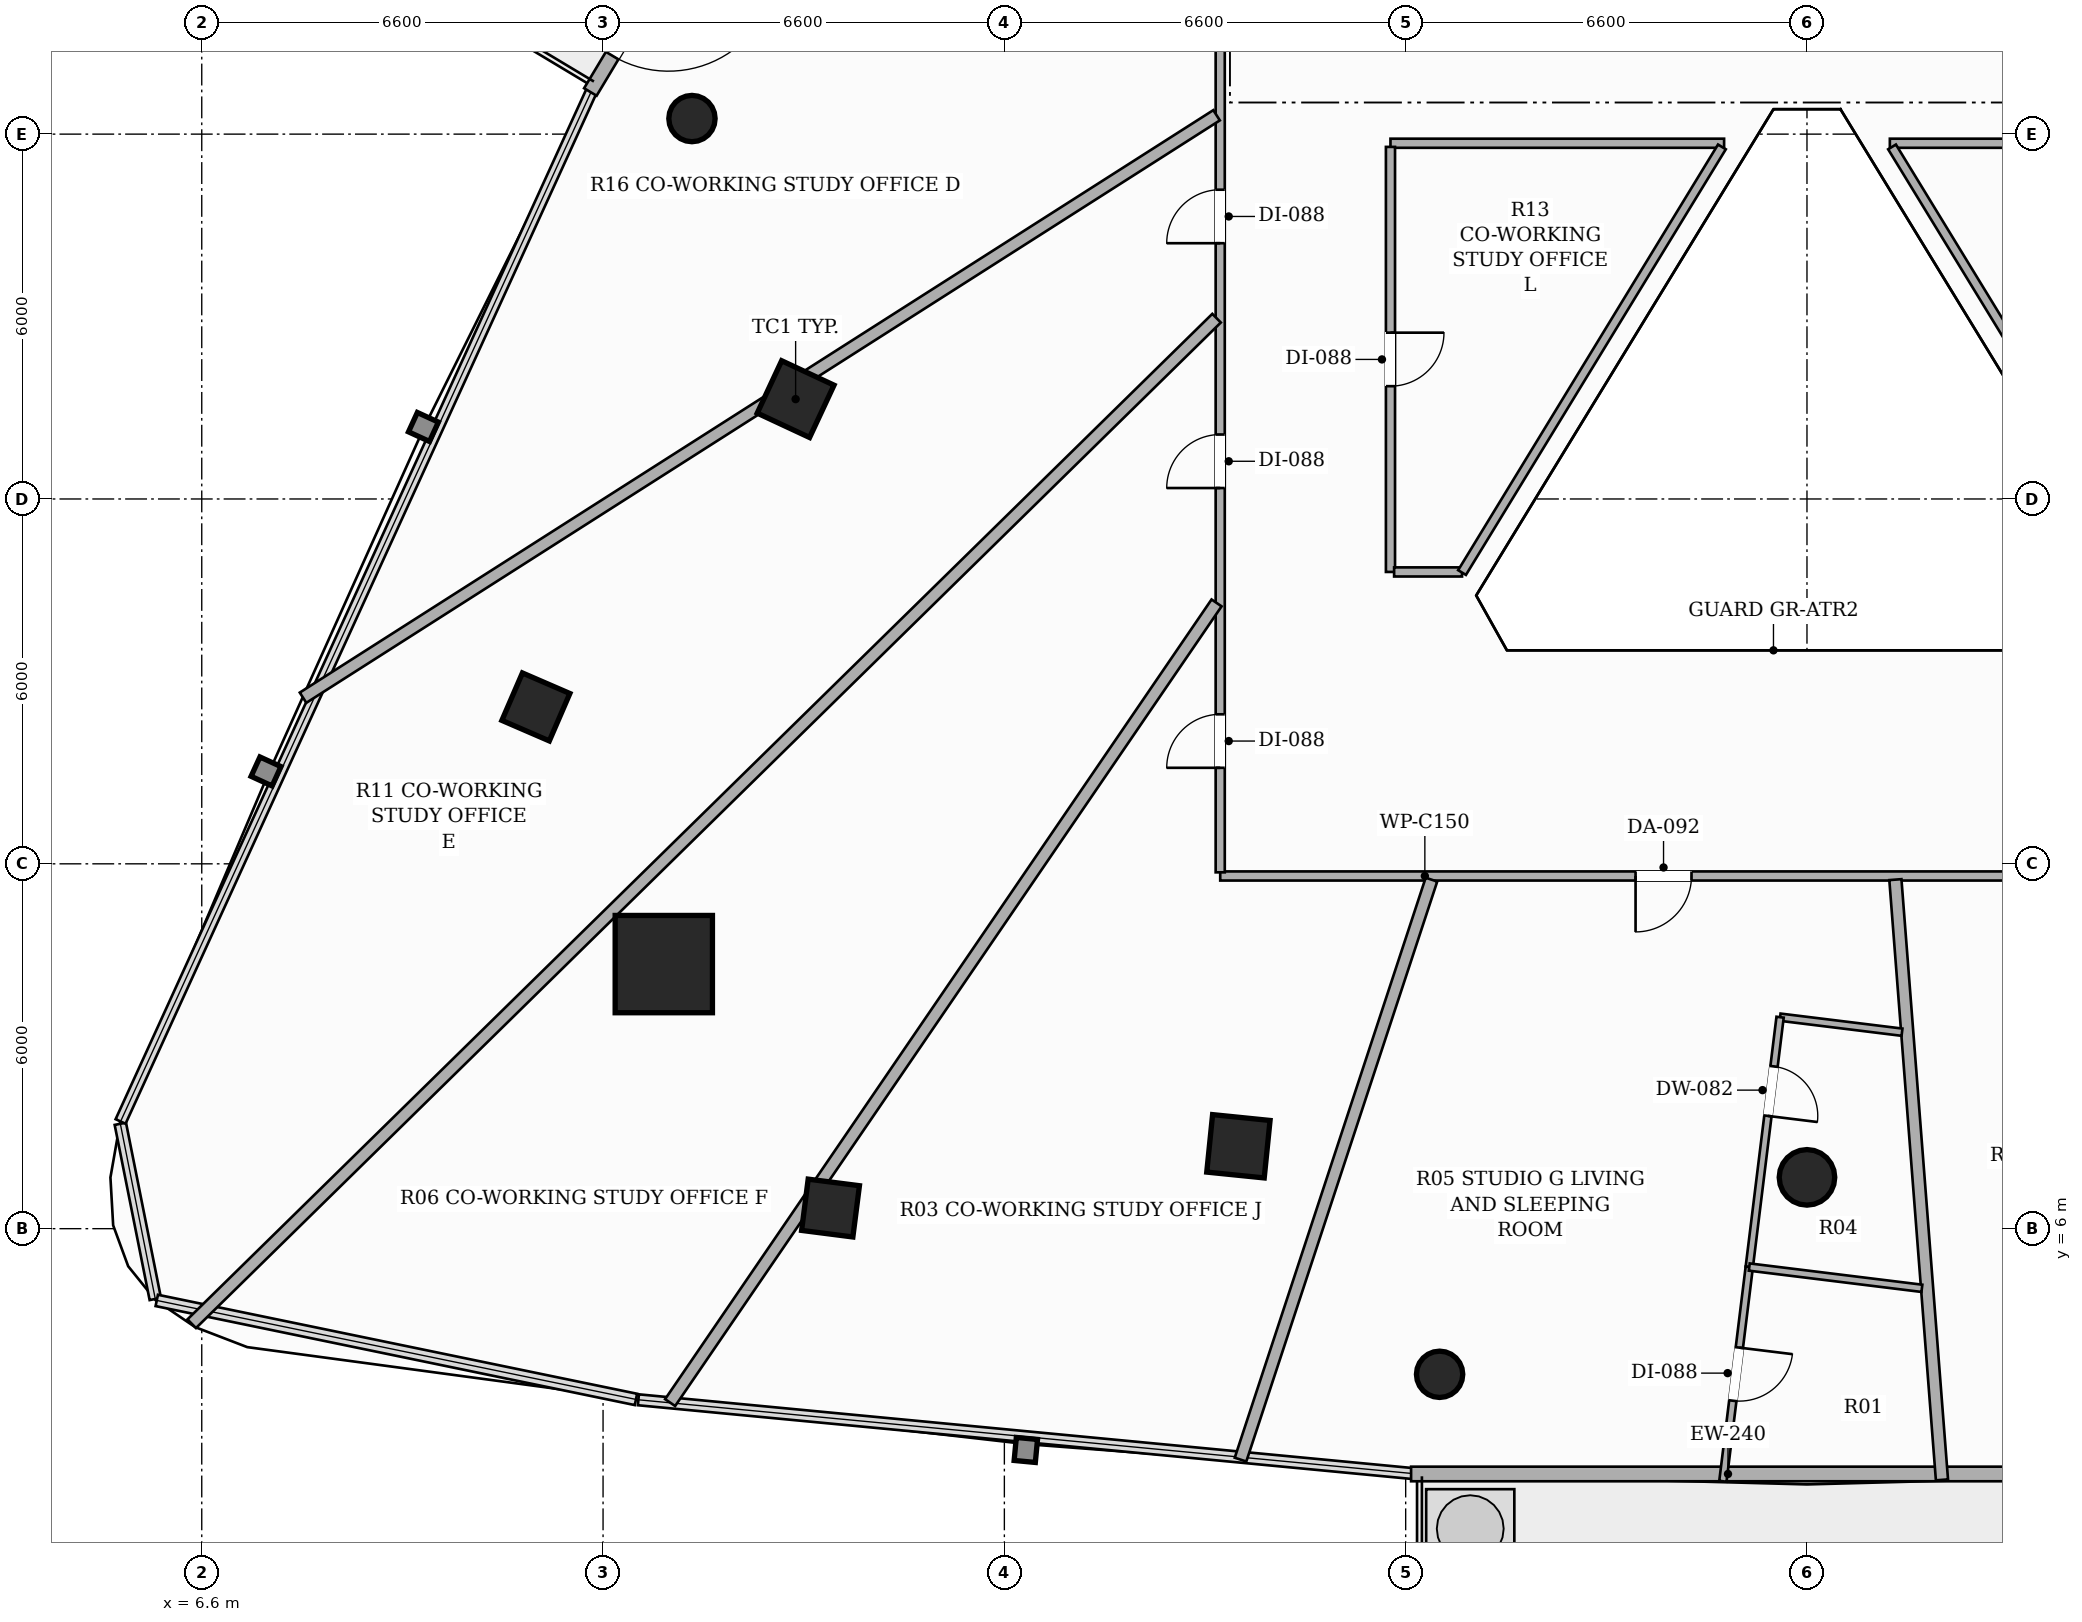
"""IFC4 building model, lengths in metres.
Left out: names, types, materials, properties, quantities, classifications, styles, units other than length and angle.
Written with IfcOpenShell. Run it as: python <this file> out.ifc"""

import sys

from ifc_helpers import new_model, si_unit, direction, frame, frame_2d, origin, origin_2d, place, context, subcontext, project, spatial, rectangle, hollow_rectangle, hollow_circle, extrude, element, fill, save


model = new_model("IFC4")
c1 = context("Model", 3, precision=1e-05, world=origin(), true_north=direction((0.0, 1.0)))
c2 = subcontext(c1, "Body", "Model", "MODEL_VIEW")
j1 = project(units=[si_unit("LENGTHUNIT", "METRE"), si_unit("PLANEANGLEUNIT", "RADIAN")], contexts=[c1])
p1 = place(None, origin())
s1 = spatial("IfcSite", under=j1, at=p1, CompositionType="ELEMENT")
p2 = place(p1, origin())
s2 = spatial("IfcBuilding", under=s1, at=p2, CompositionType="ELEMENT")
p3 = place(p2, frame((0.0, 0.0, 67.55)))
s3 = spatial("IfcBuildingStorey", under=s2, at=p3, CompositionType="ELEMENT", Elevation=67.55)
p4 = place(p3, frame((14.199, 10.351, 0.0), z_axis=(0.0, 0.0, 1.0), x_axis=(1.0, 0.0, 0.0)))
e1 = element("IfcColumn", 1, at=p4, inside=s3, PredefinedType="COLUMN", context=c2, shape_type="SweptSolid", body=[
    extrude(hollow_rectangle(XDim=1.6, YDim=1.6, WallThickness=0.05, at=origin_2d()), origin(), (0.0, 0.0, 1.0), 3.3),
])
for number, where, z_axis, x_axis in (
    (2, (16.367, 19.642, 0.0), (0.0, 0.0, 1.0), (0.423, 0.906, 0.0)),
    (3, (23.649, 7.355, 0.0), (0.0, 0.0, 1.0), (-0.995, 0.101, 0.0)),
):
    element("IfcColumn", number, at=place(p3, frame(where, z_axis=z_axis, x_axis=x_axis)), inside=s3, PredefinedType="COLUMN", context=c2, shape_type="SweptSolid", body=[
        extrude(hollow_rectangle(XDim=0.95, YDim=0.95, WallThickness=0.032, at=origin_2d()), origin(), (0.0, 0.0, 1.0), 3.3),
    ])
p5 = place(p3, frame((33.0, 6.844, 0.0), z_axis=(0.0, 0.0, 1.0), x_axis=(1.0, 0.0, 0.0)))
e4 = element("IfcColumn", 4, at=p5, inside=s3, PredefinedType="COLUMN", context=c2, shape_type="SweptSolid", body=[
    extrude(hollow_circle(Radius=0.457, WallThickness=0.025, at=origin_2d()), origin(), (0.0, 0.0, 1.0), 3.3),
])
for number, where, z_axis, x_axis in (
    (5, (12.095, 14.58, 0.0), (0.0, 0.0, 1.0), (0.397, 0.918, 0.0)),
    (6, (16.941, 6.339, 0.0), (0.0, 0.0, 1.0), (-0.992, 0.127, 0.0)),
):
    element("IfcColumn", number, at=place(p3, frame(where, z_axis=z_axis, x_axis=x_axis)), inside=s3, PredefinedType="COLUMN", context=c2, shape_type="SweptSolid", body=[
        extrude(hollow_rectangle(XDim=0.85, YDim=0.85, WallThickness=0.028, at=origin_2d()), origin(), (0.0, 0.0, 1.0), 3.3),
    ])
for number, where, z_axis, x_axis in (
    (7, (14.662, 24.256, 0.0), (0.0, 0.0, 1.0), (1.0, 0.0, 0.0)),
    (8, (26.958, 3.605, 0.0), (0.0, 0.0, 1.0), (1.0, 0.0, 0.0)),
):
    element("IfcColumn", number, at=place(p3, frame(where, z_axis=z_axis, x_axis=x_axis)), inside=s3, PredefinedType="COLUMN", context=c2, shape_type="SweptSolid", body=[
        extrude(hollow_circle(Radius=0.381, WallThickness=0.022, at=origin_2d()), origin(), (0.0, 0.0, 1.0), 3.3),
    ])
p6 = place(p3, frame((19.473, 35.501, 0.0), z_axis=(0.0, 0.0, 1.0), x_axis=(-0.514333361126, -0.857590341382, 0.0)))
e9 = element("IfcWall", 9, at=p6, inside=s3, PredefinedType="SOLIDWALL", context=c2, shape_type="SweptSolid", body=[
    extrude(rectangle(XDim=12.603, YDim=0.24, at=frame_2d((6.301, 0.0))), origin(), (0.0, 0.0, 1.0), 2.624),
])
p7 = place(p6, frame((10.105, 0.0, 0.0)))
e10 = element("IfcOpeningElement", 10, at=p7, cuts=e9, PredefinedType="OPENING", context=c2, shape_type="SweptSolid", body=[
    extrude(rectangle(XDim=1.8, YDim=2.2, at=frame_2d((0.9, 1.1))), frame((0.0, 0.13, 0.0), z_axis=(0.0, -1.0, 0.0), x_axis=(1.0, 0.0, 0.0)), (0.0, 0.0, 1.0), 0.26),
])
p8 = place(p3, frame((26.489, 1.966, 0.0), z_axis=(0.0, 0.0, 1.0), x_axis=(1.0, 0.0, 0.0)))
e11 = element("IfcWall", 11, at=p8, inside=s3, PredefinedType="SOLIDWALL", context=c2, shape_type="SweptSolid", body=[
    extrude(rectangle(XDim=13.022, YDim=0.24, at=frame_2d((6.511, 0.0))), origin(), (0.0, 0.0, 1.0), 2.624),
])
p9 = place(p8, frame((10.524, 0.0, 0.0)))
e12 = element("IfcOpeningElement", 12, at=p9, cuts=e11, PredefinedType="OPENING", context=c2, shape_type="SweptSolid", body=[
    extrude(rectangle(XDim=1.8, YDim=2.2, at=frame_2d((0.9, 1.1))), frame((0.0, 0.13, 0.0), z_axis=(0.0, -1.0, 0.0), x_axis=(1.0, 0.0, 0.0)), (0.0, 0.0, 1.0), 0.26),
])
p10 = place(p3, frame((42.59, 11.8, 0.0), z_axis=(0.0, 0.0, 1.0), x_axis=(-1.0, 0.0, 0.0)))
e13 = element("IfcWall", 13, at=p10, inside=s3, PredefinedType="PARTITIONING", context=c2, shape_type="SweptSolid", body=[
    extrude(rectangle(XDim=19.24, YDim=0.15, at=frame_2d((9.62, 0.0))), origin(), (0.0, 0.0, 1.0), 2.669),
])
p11 = place(p10, frame((11.489, 0.0, 0.0)))
e14 = element("IfcOpeningElement", 14, at=p11, cuts=e13, PredefinedType="OPENING", context=c2, shape_type="SweptSolid", body=[
    extrude(rectangle(XDim=0.92, YDim=2.15, at=frame_2d((0.46, 1.075))), frame((0.0, 0.085, 0.0), z_axis=(0.0, -1.0, 0.0), x_axis=(1.0, 0.0, 0.0)), (0.0, 0.0, 1.0), 0.17),
])
p12 = place(p10, frame((3.787, 0.0, 0.0)))
e15 = element("IfcOpeningElement", 15, at=p12, cuts=e13, PredefinedType="OPENING", context=c2, shape_type="SweptSolid", body=[
    extrude(rectangle(XDim=0.92, YDim=2.15, at=frame_2d((0.46, 1.075))), frame((0.0, 0.085, 0.0), z_axis=(0.0, -1.0, 0.0), x_axis=(1.0, 0.0, 0.0)), (0.0, 0.0, 1.0), 0.17),
])
p13 = place(p3, frame((23.35, 11.86, 0.0), z_axis=(0.0, 0.0, 1.0), x_axis=(0.0, 1.0, 0.0)))
e16 = element("IfcWall", 16, at=p13, inside=s3, PredefinedType="PARTITIONING", context=c2, shape_type="SweptSolid", body=[
    extrude(rectangle(XDim=25.04, YDim=0.15, at=frame_2d((12.52, 0.0))), origin(), (0.0, 0.0, 1.0), 2.413),
])
p14 = place(p13, frame((18.154, 0.0, 0.0)))
e17 = element("IfcOpeningElement", 17, at=p14, cuts=e16, PredefinedType="OPENING", context=c2, shape_type="SweptSolid", body=[
    extrude(rectangle(XDim=0.88, YDim=2.1, at=frame_2d((0.44, 1.05))), frame((0.0, 0.085, 0.0), z_axis=(0.0, -1.0, 0.0), x_axis=(1.0, 0.0, 0.0)), (0.0, 0.0, 1.0), 0.17),
])
p15 = place(p13, frame((10.346, 0.0, 0.0)))
e18 = element("IfcOpeningElement", 18, at=p15, cuts=e16, PredefinedType="OPENING", context=c2, shape_type="SweptSolid", body=[
    extrude(rectangle(XDim=0.88, YDim=2.1, at=frame_2d((0.44, 1.05))), frame((0.0, 0.085, 0.0), z_axis=(0.0, -1.0, 0.0), x_axis=(1.0, 0.0, 0.0)), (0.0, 0.0, 1.0), 0.17),
])
p16 = place(p13, frame((6.32, 0.0, 0.0)))
e19 = element("IfcOpeningElement", 19, at=p16, cuts=e16, PredefinedType="OPENING", context=c2, shape_type="SweptSolid", body=[
    extrude(rectangle(XDim=0.88, YDim=2.1, at=frame_2d((0.44, 1.05))), frame((0.0, 0.085, 0.0), z_axis=(0.0, -1.0, 0.0), x_axis=(1.0, 0.0, 0.0)), (0.0, 0.0, 1.0), 0.17),
])
p17 = place(p13, frame((1.719, 0.0, 0.0)))
e20 = element("IfcOpeningElement", 20, at=p17, cuts=e16, PredefinedType="OPENING", context=c2, shape_type="SweptSolid", body=[
    extrude(rectangle(XDim=0.88, YDim=2.1, at=frame_2d((0.44, 1.05))), frame((0.0, 0.085, 0.0), z_axis=(0.0, -1.0, 0.0), x_axis=(1.0, 0.0, 0.0)), (0.0, 0.0, 1.0), 0.17),
])
p18 = place(p3, frame((31.637, 23.85, 0.0), z_axis=(0.0, 0.0, 1.0), x_axis=(-1.0, 0.0, 0.0)))
e21 = element("IfcWall", 21, at=p18, inside=s3, PredefinedType="PARTITIONING", context=c2, shape_type="SweptSolid", body=[
    extrude(rectangle(XDim=5.487, YDim=0.15, at=frame_2d((2.744, 0.0))), origin(), (0.0, 0.0, 1.0), 2.669),
])
p19 = place(p3, frame((26.15, 23.79, 0.0), z_axis=(0.0, 0.0, 1.0), x_axis=(0.0, -1.0, 0.0)))
e22 = element("IfcWall", 22, at=p19, inside=s3, PredefinedType="PARTITIONING", context=c2, shape_type="SweptSolid", body=[
    extrude(rectangle(XDim=6.99, YDim=0.15, at=frame_2d((3.495, 0.0))), origin(), (0.0, 0.0, 1.0), 2.669),
])
p20 = place(p19, frame((3.055, 0.0, 0.0)))
e23 = element("IfcOpeningElement", 23, at=p20, cuts=e22, PredefinedType="OPENING", context=c2, shape_type="SweptSolid", body=[
    extrude(rectangle(XDim=0.88, YDim=2.1, at=frame_2d((0.44, 1.05))), frame((0.0, 0.085, 0.0), z_axis=(0.0, -1.0, 0.0), x_axis=(1.0, 0.0, 0.0)), (0.0, 0.0, 1.0), 0.17),
])
p21 = place(p3, frame((26.21, 16.8, 0.0), z_axis=(0.0, 0.0, 1.0), x_axis=(1.0, 0.0, 0.0)))
e24 = element("IfcWall", 24, at=p21, inside=s3, PredefinedType="PARTITIONING", context=c2, shape_type="SweptSolid", body=[
    extrude(rectangle(XDim=1.117, YDim=0.15, at=frame_2d((0.559, 0.0))), origin(), (0.0, 0.0, 1.0), 3.06),
])
p22 = place(p3, frame((39.79, 23.85, 0.0), z_axis=(0.0, 0.0, 1.0), x_axis=(-1.0, 0.0, 0.0)))
e25 = element("IfcWall", 25, at=p22, inside=s3, PredefinedType="PARTITIONING", context=c2, shape_type="SweptSolid", body=[
    extrude(rectangle(XDim=5.427, YDim=0.15, at=frame_2d((2.713, 0.0))), origin(), (0.0, 0.0, 1.0), 2.669),
])
p23 = place(p3, frame((27.327, 16.79, 0.0), z_axis=(0.0, 0.0, 1.0), x_axis=(0.521129693902, 0.853477499489, 0.0)))
e26 = element("IfcWall", 26, at=p23, inside=s3, PredefinedType="PARTITIONING", context=c2, shape_type="SweptSolid", body=[
    extrude(rectangle(XDim=8.202, YDim=0.15, at=frame_2d((4.101, 0.0))), origin(), (0.0, 0.0, 1.0), 2.669),
])
p24 = place(p3, frame((34.399, 23.79, 0.0), z_axis=(0.0, 0.0, 1.0), x_axis=(0.521619930676, -0.853177969665, 0.0)))
e27 = element("IfcWall", 27, at=p24, inside=s3, PredefinedType="PARTITIONING", context=c2, shape_type="SweptSolid", body=[
    extrude(rectangle(XDim=8.194, YDim=0.15, at=frame_2d((4.097, 0.0))), origin(), (0.0, 0.0, 1.0), 2.669),
])
p25 = place(p3, frame((23.29, 24.31, 0.0), z_axis=(0.0, 0.0, 1.0), x_axis=(-0.843217726059, -0.537572196509, 0.0)))
e28 = element("IfcWall", 28, at=p25, inside=s3, PredefinedType="PARTITIONING", context=c2, shape_type="SweptSolid", body=[
    extrude(rectangle(XDim=17.817, YDim=0.2, at=frame_2d((8.909, 0.0))), origin(), (0.0, 0.0, 1.0), 2.413),
])
p26 = place(p3, frame((23.29, 20.973, 0.0), z_axis=(0.0, 0.0, 1.0), x_axis=(-0.713831483248, -0.70031750908, 0.0)))
e29 = element("IfcWall", 29, at=p26, inside=s3, PredefinedType="PARTITIONING", context=c2, shape_type="SweptSolid", body=[
    extrude(rectangle(XDim=23.612, YDim=0.2, at=frame_2d((11.806, 0.0))), origin(), (0.0, 0.0, 1.0), 2.413),
])
p27 = place(p3, frame((23.29, 16.291, 0.0), z_axis=(0.0, 0.0, 1.0), x_axis=(-0.564210182678, -0.825631194761, 0.0)))
e30 = element("IfcWall", 30, at=p27, inside=s3, PredefinedType="PARTITIONING", context=c2, shape_type="SweptSolid", body=[
    extrude(rectangle(XDim=15.928, YDim=0.2, at=frame_2d((7.964, 0.0))), origin(), (0.0, 0.0, 1.0), 2.413),
])
p28 = place(p3, frame((34.454, 11.74, 0.0), z_axis=(0.0, 0.0, 1.0), x_axis=(0.077354581403, -0.997003645297, 0.0)))
e31 = element("IfcWall", 31, at=p28, inside=s3, PredefinedType="PARTITIONING", context=c2, shape_type="SweptSolid", body=[
    extrude(rectangle(XDim=9.901, YDim=0.2, at=frame_2d((4.95, 0.0))), origin(), (0.0, 0.0, 1.0), 2.413),
])
p29 = place(p3, frame((23.684, 2.202, 0.0), z_axis=(0.0, 0.0, 1.0), x_axis=(0.31268804242, 0.949855877556, 0.0)))
e32 = element("IfcWall", 32, at=p29, inside=s3, PredefinedType="PARTITIONING", context=c2, shape_type="SweptSolid", body=[
    extrude(rectangle(XDim=10.042, YDim=0.2, at=frame_2d((5.021, 0.0))), origin(), (0.0, 0.0, 1.0), 2.413),
])
p30 = place(p3, frame((34.563, 9.231, 0.0), z_axis=(0.0, 0.0, 1.0), x_axis=(-0.992492062854, 0.122309055968, 0.0)))
e33 = element("IfcWall", 33, at=p30, inside=s3, PredefinedType="PARTITIONING", context=c2, shape_type="SweptSolid", body=[
    extrude(rectangle(XDim=2.02, YDim=0.12, at=frame_2d((1.01, 0.0))), origin(), (0.0, 0.0, 1.0), 2.669),
])
p31 = place(p3, frame((32.558, 9.478, 0.0), z_axis=(0.0, 0.0, 1.0), x_axis=(-0.122474226657, -0.992471694208, 0.0)))
e34 = element("IfcWall", 34, at=p31, inside=s3, PredefinedType="PARTITIONING", context=c2, shape_type="SweptSolid", body=[
    extrude(rectangle(XDim=4.14, YDim=0.12, at=frame_2d((2.07, 0.0))), origin(), (0.0, 0.0, 1.0), 2.413),
])
p32 = place(p31, frame((0.816, 0.0, 0.0)))
e35 = element("IfcOpeningElement", 35, at=p32, cuts=e34, PredefinedType="OPENING", context=c2, shape_type="SweptSolid", body=[
    extrude(rectangle(XDim=0.82, YDim=2.1, at=frame_2d((0.41, 1.05))), frame((0.0, 0.07, 0.0), z_axis=(0.0, -1.0, 0.0), x_axis=(1.0, 0.0, 0.0)), (0.0, 0.0, 1.0), 0.14),
])
p33 = place(p3, frame((32.051, 5.369, 0.0), z_axis=(0.0, 0.0, 1.0), x_axis=(-0.122290707402, -0.992494323854, 0.0)))
e36 = element("IfcWall", 36, at=p33, inside=s3, PredefinedType="PARTITIONING", context=c2, shape_type="SweptSolid", body=[
    extrude(rectangle(XDim=3.55, YDim=0.12, at=frame_2d((1.775, 0.0))), origin(), (0.0, 0.0, 1.0), 3.06),
])
p34 = place(p33, frame((1.335, 0.0, 0.0)))
e37 = element("IfcOpeningElement", 37, at=p34, cuts=e36, PredefinedType="OPENING", context=c2, shape_type="SweptSolid", body=[
    extrude(rectangle(XDim=0.88, YDim=2.1, at=frame_2d((0.44, 1.05))), frame((0.0, 0.07, 0.0), z_axis=(0.0, -1.0, 0.0), x_axis=(1.0, 0.0, 0.0)), (0.0, 0.0, 1.0), 0.14),
])
p35 = place(p3, frame((34.89, 5.019, 0.0), z_axis=(0.0, 0.0, 1.0), x_axis=(-0.992491734807, 0.12231171792, 0.0)))
e38 = element("IfcWall", 38, at=p35, inside=s3, PredefinedType="PARTITIONING", context=c2, shape_type="SweptSolid", body=[
    extrude(rectangle(XDim=2.86, YDim=0.12, at=frame_2d((1.43, 0.0))), origin(), (0.0, 0.0, 1.0), 3.06),
])
p36 = place(p7, origin())
e39 = element("IfcDoor", 39, at=p36, inside=s3, OperationType="SINGLE_SWING_LEFT", PredefinedType="DOOR", context=c2, shape_type="SweptSolid", body=[
    extrude(rectangle(XDim=1.8, YDim=2.2, at=frame_2d((0.9, 1.1))), frame((0.0, 0.025, 0.0), z_axis=(0.0, -1.0, 0.0), x_axis=(1.0, 0.0, 0.0)), (0.0, 0.0, 1.0), 0.05),
])
fill(e10, e39)
p37 = place(p15, origin())
e40 = element("IfcDoor", 40, at=p37, inside=s3, OperationType="SINGLE_SWING_LEFT", PredefinedType="DOOR", context=c2, shape_type="SweptSolid", body=[
    extrude(rectangle(XDim=0.88, YDim=2.1, at=frame_2d((0.44, 1.05))), frame((0.0, 0.025, 0.0), z_axis=(0.0, -1.0, 0.0), x_axis=(1.0, 0.0, 0.0)), (0.0, 0.0, 1.0), 0.05),
])
fill(e18, e40)
p38 = place(p16, origin())
e41 = element("IfcDoor", 41, at=p38, inside=s3, OperationType="SINGLE_SWING_LEFT", PredefinedType="DOOR", context=c2, shape_type="SweptSolid", body=[
    extrude(rectangle(XDim=0.88, YDim=2.1, at=frame_2d((0.44, 1.05))), frame((0.0, 0.025, 0.0), z_axis=(0.0, -1.0, 0.0), x_axis=(1.0, 0.0, 0.0)), (0.0, 0.0, 1.0), 0.05),
])
fill(e19, e41)
p39 = place(p11, origin())
e42 = element("IfcDoor", 42, at=p39, inside=s3, OperationType="SINGLE_SWING_RIGHT", PredefinedType="DOOR", context=c2, shape_type="SweptSolid", body=[
    extrude(rectangle(XDim=0.92, YDim=2.15, at=frame_2d((0.46, 1.075))), frame((0.0, 0.025, 0.0), z_axis=(0.0, -1.0, 0.0), x_axis=(1.0, 0.0, 0.0)), (0.0, 0.0, 1.0), 0.05),
])
fill(e14, e42)
p40 = place(p32, origin())
e43 = element("IfcDoor", 43, at=p40, inside=s3, OperationType="SINGLE_SWING_RIGHT", PredefinedType="DOOR", context=c2, shape_type="SweptSolid", body=[
    extrude(rectangle(XDim=0.82, YDim=2.1, at=frame_2d((0.41, 1.05))), frame((0.0, 0.025, 0.0), z_axis=(0.0, -1.0, 0.0), x_axis=(1.0, 0.0, 0.0)), (0.0, 0.0, 1.0), 0.05),
])
fill(e35, e43)
p41 = place(p34, origin())
e44 = element("IfcDoor", 44, at=p41, inside=s3, OperationType="SINGLE_SWING_LEFT", PredefinedType="DOOR", context=c2, shape_type="SweptSolid", body=[
    extrude(rectangle(XDim=0.88, YDim=2.1, at=frame_2d((0.44, 1.05))), frame((0.0, 0.025, 0.0), z_axis=(0.0, -1.0, 0.0), x_axis=(1.0, 0.0, 0.0)), (0.0, 0.0, 1.0), 0.05),
])
fill(e37, e44)
p42 = place(p17, origin())
e45 = element("IfcDoor", 45, at=p42, inside=s3, OperationType="SINGLE_SWING_LEFT", PredefinedType="DOOR", context=c2, shape_type="SweptSolid", body=[
    extrude(rectangle(XDim=0.88, YDim=2.1, at=frame_2d((0.44, 1.05))), frame((0.0, 0.025, 0.0), z_axis=(0.0, -1.0, 0.0), x_axis=(1.0, 0.0, 0.0)), (0.0, 0.0, 1.0), 0.05),
])
fill(e20, e45)
p43 = place(p20, origin())
e46 = element("IfcDoor", 46, at=p43, inside=s3, OperationType="SINGLE_SWING_LEFT", PredefinedType="DOOR", context=c2, shape_type="SweptSolid", body=[
    extrude(rectangle(XDim=0.88, YDim=2.1, at=frame_2d((0.44, 1.05))), frame((0.0, 0.025, 0.0), z_axis=(0.0, -1.0, 0.0), x_axis=(1.0, 0.0, 0.0)), (0.0, 0.0, 1.0), 0.05),
])
fill(e23, e46)
save(model, sys.argv[1])
